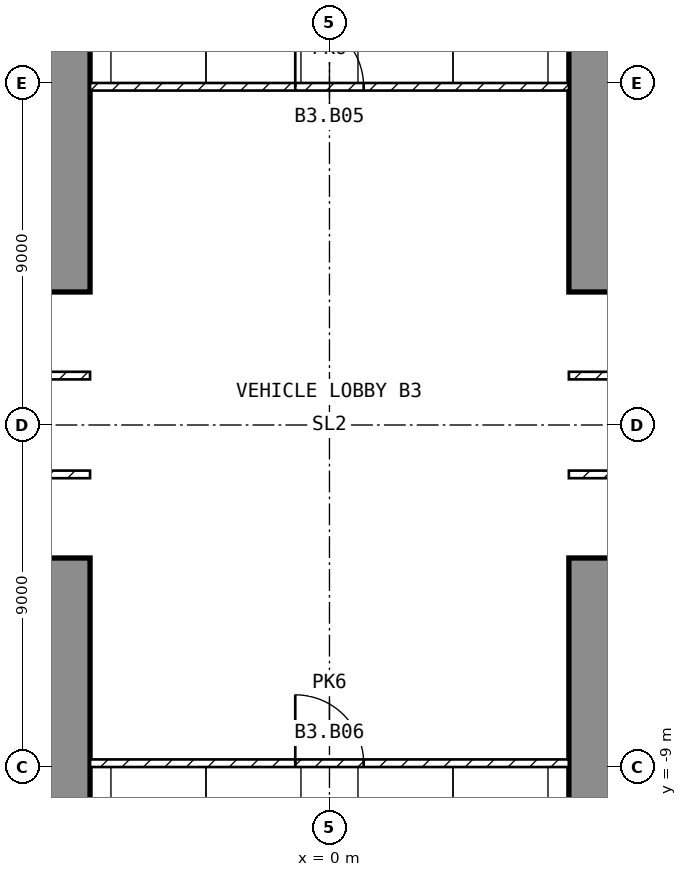
"""IFC4 building model, lengths in metres.
Left out: names, types, materials, properties, quantities, classifications, styles, units other than length and angle.
Written with IfcOpenShell. Run it as: python <this file> out.ifc"""

import sys

from ifc_helpers import new_model, si_unit, direction, frame, frame_2d, origin, place, context, subcontext, project, spatial, polyline, rectangle, outline, extrude, element, fill, save


model = new_model("IFC4")
c1 = context("Model", 3, precision=1e-05, world=origin(), true_north=direction((0.0, 1.0)))
c2 = subcontext(c1, "Body", "Model", "MODEL_VIEW")
j1 = project(units=[si_unit("LENGTHUNIT", "METRE"), si_unit("PLANEANGLEUNIT", "RADIAN")], contexts=[c1])
p1 = place(None, origin())
s1 = spatial("IfcSite", under=j1, at=p1, CompositionType="ELEMENT")
p2 = place(p1, origin())
s2 = spatial("IfcBuilding", under=s1, at=p2, CompositionType="ELEMENT")
p3 = place(p2, frame((0.0, 0.0, -12.9)))
s3 = spatial("IfcBuildingStorey", under=s2, at=p3, CompositionType="ELEMENT", Elevation=-12.9)
p4 = place(p3, frame((6.3, -27.0, -0.3), z_axis=(1.0, 0.0, 0.0), x_axis=(0.0, 1.0, 0.0)))
e1 = element("IfcWall", 1, at=p4, inside=s3, PredefinedType="SOLIDWALL", context=c2, shape_type="SweptSolid", body=[
    extrude(outline(polyline([(0.0, 0.0), (5.5, 0.0), (5.5, 3.3), (12.5, 3.3), (12.5, 0.0), (23.5, 0.0), (23.5, 4.2), (0.0, 4.2), (0.0, 0.0)])), origin(), (0.0, 0.0, 1.0), 2.7),
])
p5 = place(p3, frame((6.3, 3.5, -0.3), z_axis=(1.0, 0.0, 0.0), x_axis=(0.0, 1.0, 0.0)))
e2 = element("IfcWall", 2, at=p5, inside=s3, PredefinedType="SOLIDWALL", context=c2, shape_type="SweptSolid", body=[
    extrude(outline(polyline([(0.0, 0.0), (11.0, 0.0), (11.0, 3.3), (18.0, 3.3), (18.0, 0.0), (23.5, 0.0), (23.5, 4.2), (0.0, 4.2), (0.0, 0.0)])), origin(), (0.0, 0.0, 1.0), 2.7),
])
p6 = place(p3, frame((-9.0, -27.0, -0.3), z_axis=(1.0, 0.0, 0.0), x_axis=(0.0, 1.0, 0.0)))
e3 = element("IfcWall", 3, at=p6, inside=s3, PredefinedType="SOLIDWALL", context=c2, shape_type="SweptSolid", body=[
    extrude(outline(polyline([(0.0, 0.0), (5.5, 0.0), (5.5, 3.3), (12.5, 3.3), (12.5, 0.0), (23.5, 0.0), (23.5, 4.2), (0.0, 4.2), (0.0, 0.0)])), origin(), (0.0, 0.0, 1.0), 2.7),
])
p7 = place(p3, frame((-9.0, 3.5, -0.3), z_axis=(1.0, 0.0, 0.0), x_axis=(0.0, 1.0, 0.0)))
e4 = element("IfcWall", 4, at=p7, inside=s3, PredefinedType="SOLIDWALL", context=c2, shape_type="SweptSolid", body=[
    extrude(outline(polyline([(0.0, 0.0), (11.0, 0.0), (11.0, 3.3), (18.0, 3.3), (18.0, 0.0), (23.5, 0.0), (23.5, 4.2), (0.0, 4.2), (0.0, 0.0)])), origin(), (0.0, 0.0, 1.0), 2.7),
])
p8 = place(p3, frame((6.3, 1.3, 0.0), z_axis=(0.0, 0.0, 1.0), x_axis=(1.0, 0.0, 0.0)))
e5 = element("IfcWall", 5, at=p8, inside=s3, PredefinedType="PARTITIONING", context=c2, shape_type="SweptSolid", body=[
    extrude(rectangle(XDim=15.3, YDim=0.2, at=frame_2d((7.65, 0.0))), origin(), (0.0, 0.0, 1.0), 3.9),
])
p9 = place(p8, frame((8.5, 0.0, 0.0)))
e6 = element("IfcOpeningElement", 6, at=p9, cuts=e5, PredefinedType="OPENING", context=c2, shape_type="SweptSolid", body=[
    extrude(rectangle(XDim=1.0, YDim=2.1, at=frame_2d((0.5, 1.05))), frame((0.0, 0.11, 0.0), z_axis=(0.0, -1.0, 0.0), x_axis=(1.0, 0.0, 0.0)), (0.0, 0.0, 1.0), 0.22),
])
p10 = place(p3, frame((6.3, -1.3, 0.0), z_axis=(0.0, 0.0, 1.0), x_axis=(1.0, 0.0, 0.0)))
e7 = element("IfcWall", 7, at=p10, inside=s3, PredefinedType="PARTITIONING", context=c2, shape_type="SweptSolid", body=[
    extrude(rectangle(XDim=15.3, YDim=0.2, at=frame_2d((7.65, 0.0))), origin(), (0.0, 0.0, 1.0), 3.9),
])
p11 = place(p10, frame((8.5, 0.0, 0.0)))
e8 = element("IfcOpeningElement", 8, at=p11, cuts=e7, PredefinedType="OPENING", context=c2, shape_type="SweptSolid", body=[
    extrude(rectangle(XDim=1.0, YDim=2.1, at=frame_2d((0.5, 1.05))), frame((0.0, 0.11, 0.0), z_axis=(0.0, -1.0, 0.0), x_axis=(1.0, 0.0, 0.0)), (0.0, 0.0, 1.0), 0.22),
])
p12 = place(p3, frame((-6.3, 1.3, 0.0), z_axis=(0.0, 0.0, 1.0), x_axis=(-1.0, 0.0, 0.0)))
e9 = element("IfcWall", 9, at=p12, inside=s3, PredefinedType="PARTITIONING", context=c2, shape_type="SweptSolid", body=[
    extrude(rectangle(XDim=15.3, YDim=0.2, at=frame_2d((7.65, 0.0))), origin(), (0.0, 0.0, 1.0), 3.9),
])
p13 = place(p12, frame((8.5, 0.0, 0.0)))
e10 = element("IfcOpeningElement", 10, at=p13, cuts=e9, PredefinedType="OPENING", context=c2, shape_type="SweptSolid", body=[
    extrude(rectangle(XDim=1.0, YDim=2.1, at=frame_2d((0.5, 1.05))), frame((0.0, 0.11, 0.0), z_axis=(0.0, -1.0, 0.0), x_axis=(1.0, 0.0, 0.0)), (0.0, 0.0, 1.0), 0.22),
])
p14 = place(p3, frame((-6.3, -1.3, 0.0), z_axis=(0.0, 0.0, 1.0), x_axis=(-1.0, 0.0, 0.0)))
e11 = element("IfcWall", 11, at=p14, inside=s3, PredefinedType="PARTITIONING", context=c2, shape_type="SweptSolid", body=[
    extrude(rectangle(XDim=15.3, YDim=0.2, at=frame_2d((7.65, 0.0))), origin(), (0.0, 0.0, 1.0), 3.9),
])
p15 = place(p14, frame((8.5, 0.0, 0.0)))
e12 = element("IfcOpeningElement", 12, at=p15, cuts=e11, PredefinedType="OPENING", context=c2, shape_type="SweptSolid", body=[
    extrude(rectangle(XDim=1.0, YDim=2.1, at=frame_2d((0.5, 1.05))), frame((0.0, 0.11, 0.0), z_axis=(0.0, -1.0, 0.0), x_axis=(1.0, 0.0, 0.0)), (0.0, 0.0, 1.0), 0.22),
])
p16 = place(p3, frame((-6.3, 8.9, 0.0), z_axis=(0.0, 0.0, 1.0), x_axis=(1.0, 0.0, 0.0)))
e13 = element("IfcWall", 13, at=p16, inside=s3, PredefinedType="PARTITIONING", context=c2, shape_type="SweptSolid", body=[
    extrude(rectangle(XDim=12.6, YDim=0.2, at=frame_2d((6.3, 0.0))), origin(), (0.0, 0.0, 1.0), 3.9),
])
p17 = place(p16, frame((5.4, 0.0, 0.0)))
e14 = element("IfcOpeningElement", 14, at=p17, cuts=e13, PredefinedType="OPENING", context=c2, shape_type="SweptSolid", body=[
    extrude(rectangle(XDim=1.8, YDim=2.1, at=frame_2d((0.9, 1.05))), frame((0.0, 0.11, 0.0), z_axis=(0.0, -1.0, 0.0), x_axis=(1.0, 0.0, 0.0)), (0.0, 0.0, 1.0), 0.22),
])
p18 = place(p3, frame((-6.3, -8.9, 0.0), z_axis=(0.0, 0.0, 1.0), x_axis=(1.0, 0.0, 0.0)))
e15 = element("IfcWall", 15, at=p18, inside=s3, PredefinedType="PARTITIONING", context=c2, shape_type="SweptSolid", body=[
    extrude(rectangle(XDim=12.6, YDim=0.2, at=frame_2d((6.3, 0.0))), origin(), (0.0, 0.0, 1.0), 3.9),
])
p19 = place(p18, frame((5.4, 0.0, 0.0)))
e16 = element("IfcOpeningElement", 16, at=p19, cuts=e15, PredefinedType="OPENING", context=c2, shape_type="SweptSolid", body=[
    extrude(rectangle(XDim=1.8, YDim=2.1, at=frame_2d((0.9, 1.05))), frame((0.0, 0.11, 0.0), z_axis=(0.0, -1.0, 0.0), x_axis=(1.0, 0.0, 0.0)), (0.0, 0.0, 1.0), 0.22),
])
p20 = place(p17, origin())
e17 = element("IfcDoor", 17, at=p20, inside=s3, OperationType="SINGLE_SWING_LEFT", PredefinedType="DOOR", context=c2, shape_type="SweptSolid", body=[
    extrude(rectangle(XDim=1.8, YDim=2.1, at=frame_2d((0.9, 1.05))), frame((0.0, 0.025, 0.0), z_axis=(0.0, -1.0, 0.0), x_axis=(1.0, 0.0, 0.0)), (0.0, 0.0, 1.0), 0.05),
])
fill(e14, e17)
p21 = place(p19, origin())
e18 = element("IfcDoor", 18, at=p21, inside=s3, OperationType="SINGLE_SWING_LEFT", PredefinedType="DOOR", context=c2, shape_type="SweptSolid", body=[
    extrude(rectangle(XDim=1.8, YDim=2.1, at=frame_2d((0.9, 1.05))), frame((0.0, 0.025, 0.0), z_axis=(0.0, -1.0, 0.0), x_axis=(1.0, 0.0, 0.0)), (0.0, 0.0, 1.0), 0.05),
])
fill(e16, e18)
save(model, sys.argv[1])
